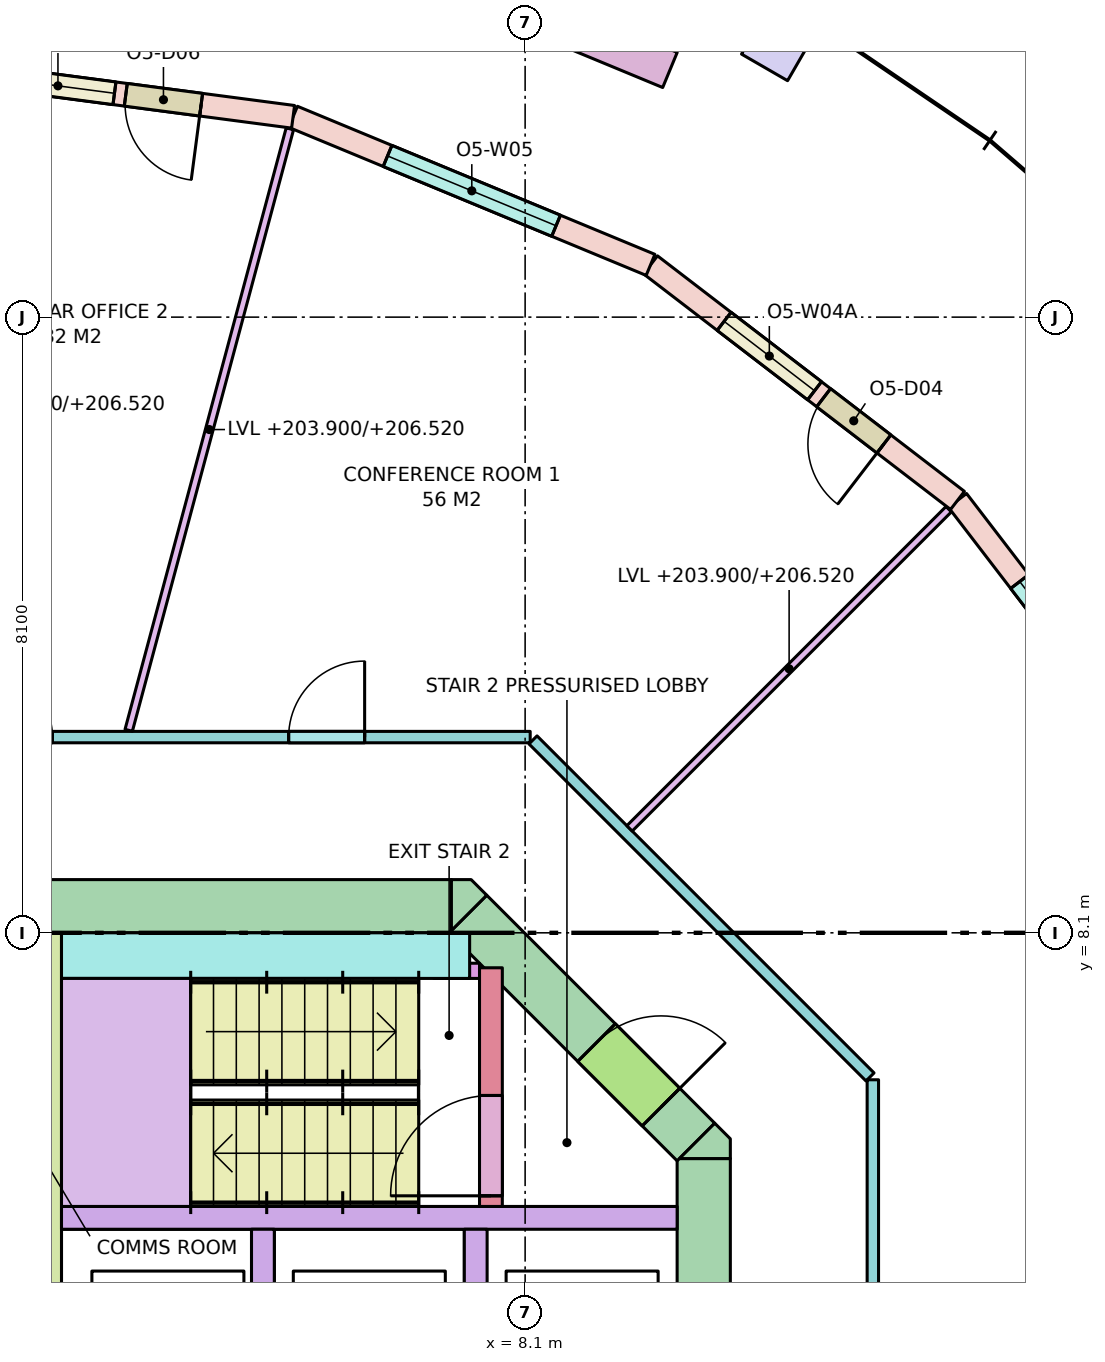
"""IFC4 building model, lengths in metres.
Left out: names, types, materials, properties, quantities, classifications, styles, units other than length and angle.
Written with IfcOpenShell. Run it as: python <this file> out.ifc"""

import sys

from ifc_helpers import new_model, si_unit, direction, frame, frame_2d, origin, origin_2d, place, context, subcontext, project, spatial, polyline, rectangle, outline, extrude, element, fill, save


model = new_model("IFC4")
c1 = context("Model", 3, precision=1e-05, world=origin(), true_north=direction((0.0, 1.0)))
c2 = subcontext(c1, "Body", "Model", "MODEL_VIEW")
j1 = project(units=[si_unit("LENGTHUNIT", "METRE"), si_unit("PLANEANGLEUNIT", "RADIAN")], contexts=[c1])
p1 = place(None, origin())
s1 = spatial("IfcSite", under=j1, at=p1, CompositionType="ELEMENT")
p2 = place(p1, origin())
s2 = spatial("IfcBuilding", under=s1, at=p2, CompositionType="ELEMENT")
p3 = place(p2, frame((0.0, 0.0, 203.9)))
s3 = spatial("IfcBuildingStorey", under=s2, at=p3, CompositionType="ELEMENT", Elevation=203.9)
p4 = place(p3, frame((11.5, 19.919, 0.0), z_axis=(0.0, 0.0, 1.0), x_axis=(-0.866025403784, 0.5, 0.0)))
e1 = element("IfcColumn", 1, at=p4, inside=s3, PredefinedType="COLUMN", context=c2, shape_type="SweptSolid", body=[
    extrude(rectangle(XDim=0.7, YDim=1.0, at=origin_2d()), origin(), (0.0, 0.0, 1.0), 3.7),
])
p5 = place(p3, frame((-7.13, 8.45, -0.28), z_axis=(0.0, 0.0, 1.0), x_axis=(1.0, 0.0, 0.0)))
e2 = element("IfcWall", 2, at=p5, inside=s3, PredefinedType="SHEAR", context=c2, shape_type="SweptSolid", body=[
    extrude(rectangle(XDim=14.26, YDim=0.7, at=frame_2d((7.13, 0.0))), origin(), (0.0, 0.0, 1.0), 3.7),
])
p6 = place(p5, frame((5.48, 0.0, 0.28)))
e3 = element("IfcOpeningElement", 3, at=p6, cuts=e2, PredefinedType="OPENING", context=c2, shape_type="SweptSolid", body=[
    extrude(rectangle(XDim=0.7, YDim=2.1, at=frame_2d((0.35, 1.05))), frame((0.0, 0.36, 0.0), z_axis=(0.0, -1.0, 0.0), x_axis=(1.0, 0.0, 0.0)), (0.0, 0.0, 1.0), 0.72),
])
p7 = place(p5, frame((6.53, 0.0, 0.28)))
e4 = element("IfcOpeningElement", 4, at=p7, cuts=e2, PredefinedType="OPENING", context=c2, shape_type="SweptSolid", body=[
    extrude(rectangle(XDim=0.85, YDim=2.1, at=frame_2d((0.425, 1.05))), frame((0.0, 0.36, 0.0), z_axis=(0.0, -1.0, 0.0), x_axis=(1.0, 0.0, 0.0)), (0.0, 0.0, 1.0), 0.72),
])
p8 = place(p5, frame((7.83, 0.0, 0.28)))
e5 = element("IfcOpeningElement", 5, at=p8, cuts=e2, PredefinedType="OPENING", context=c2, shape_type="SweptSolid", body=[
    extrude(rectangle(XDim=0.85, YDim=2.1, at=frame_2d((0.425, 1.05))), frame((0.0, 0.36, 0.0), z_axis=(0.0, -1.0, 0.0), x_axis=(1.0, 0.0, 0.0)), (0.0, 0.0, 1.0), 0.72),
])
p9 = place(p3, frame((10.45, -5.13, -0.28), z_axis=(0.0, 0.0, 1.0), x_axis=(0.0, 1.0, 0.0)))
e6 = element("IfcWall", 6, at=p9, inside=s3, PredefinedType="SHEAR", context=c2, shape_type="SweptSolid", body=[
    extrude(rectangle(XDim=10.26, YDim=0.7, at=frame_2d((5.13, 0.0))), origin(), (0.0, 0.0, 1.0), 3.7),
])
p10 = place(p9, frame((4.13, 0.0, 0.28)))
e7 = element("IfcOpeningElement", 7, at=p10, cuts=e6, PredefinedType="OPENING", context=c2, shape_type="SweptSolid", body=[
    extrude(rectangle(XDim=2.0, YDim=2.1, at=frame_2d((1.0, 1.05))), frame((0.0, 0.36, 0.0), z_axis=(0.0, -1.0, 0.0), x_axis=(1.0, 0.0, 0.0)), (0.0, 0.0, 1.0), 0.72),
])
p11 = place(p3, frame((7.347, 8.347, -0.28), z_axis=(0.0, 0.0, 1.0), x_axis=(0.707106781187, -0.707106781187, 0.0)))
e8 = element("IfcWall", 8, at=p11, inside=s3, PredefinedType="SHEAR", context=c2, shape_type="SweptSolid", body=[
    extrude(rectangle(XDim=4.243, YDim=0.7, at=frame_2d((2.121, 0.0))), origin(), (0.0, 0.0, 1.0), 3.7),
])
p12 = place(p11, frame((2.393, 0.0, 0.28)))
e9 = element("IfcOpeningElement", 9, at=p12, cuts=e8, PredefinedType="OPENING", context=c2, shape_type="SweptSolid", body=[
    extrude(rectangle(XDim=1.2, YDim=2.1, at=frame_2d((0.6, 1.05))), frame((0.0, 0.36, 0.0), z_axis=(0.0, -1.0, 0.0), x_axis=(1.0, 0.0, 0.0)), (0.0, 0.0, 1.0), 0.72),
])
p13 = place(p3, frame((0.0, 0.0, -0.28)))
e10 = element("IfcWall", 10, at=p13, inside=s3, PredefinedType="SHEAR", context=c2, shape_type="SweptSolid", body=[
    extrude(outline(polyline([(10.8, 5.39), (10.8, 5.13), (10.8, 5.13), (10.13, 5.13), (10.595, 5.595), (10.595, 5.595), (10.595, 5.595), (10.8, 5.39)])), origin(), (0.0, 0.0, 1.0), 3.7),
])
p14 = place(p3, frame((0.0, 0.0, -0.28)))
e11 = element("IfcWall", 11, at=p14, inside=s3, PredefinedType="SHEAR", context=c2, shape_type="SweptSolid", body=[
    extrude(outline(polyline([(7.39, 8.8), (7.595, 8.595), (7.595, 8.595), (7.595, 8.595), (7.13, 8.13), (7.13, 8.8), (7.13, 8.8), (7.39, 8.8)])), origin(), (0.0, 0.0, 1.0), 3.7),
])
p15 = place(p3, frame((2.0, 4.35, 0.0), z_axis=(0.0, 0.0, 1.0), x_axis=(1.0, 0.0, 0.0)))
e12 = element("IfcWall", 12, at=p15, inside=s3, PredefinedType="SOLIDWALL", context=c2, shape_type="SweptSolid", body=[
    extrude(rectangle(XDim=8.1, YDim=0.3, at=frame_2d((4.05, 0.0))), origin(), (0.0, 0.0, 1.0), 3.42),
])
for number, where, z_axis, x_axis in (
    (13, (4.65, 1.8, 0.0), (0.0, 0.0, 1.0), (0.0, 1.0, 0.0)),
    (14, (7.45, 1.8, 0.0), (0.0, 0.0, 1.0), (0.0, 1.0, 0.0)),
):
    element("IfcWall", number, at=place(p3, frame(where, z_axis=z_axis, x_axis=x_axis)), inside=s3, PredefinedType="SOLIDWALL", context=c2, shape_type="SweptSolid", body=[
        extrude(rectangle(XDim=2.4, YDim=0.3, at=frame_2d((1.2, 0.0))), origin(), (0.0, 0.0, 1.0), 3.42),
    ])
p16 = place(p3, frame((1.85, 1.5, 0.0), z_axis=(0.0, 0.0, 1.0), x_axis=(0.0, 1.0, 0.0)))
e15 = element("IfcWall", 15, at=p16, inside=s3, PredefinedType="SHEAR", context=c2, shape_type="SweptSolid", body=[
    extrude(rectangle(XDim=6.6, YDim=0.3, at=frame_2d((3.3, 0.0))), origin(), (0.0, 0.0, 1.0), 3.42),
])
p17 = place(p3, frame((7.65, 4.5, 0.0), z_axis=(0.0, 0.0, 1.0), x_axis=(0.0, 1.0, 0.0)))
e16 = element("IfcWall", 16, at=p17, inside=s3, PredefinedType="SHEAR", context=c2, shape_type="SweptSolid", body=[
    extrude(rectangle(XDim=3.14, YDim=0.3, at=frame_2d((1.57, 0.0))), origin(), (0.0, 0.0, 1.0), 3.42),
])
p18 = place(p17, frame((0.14, 0.0, 0.0)))
e17 = element("IfcOpeningElement", 17, at=p18, cuts=e16, PredefinedType="OPENING", context=c2, shape_type="SweptSolid", body=[
    extrude(rectangle(XDim=1.32, YDim=2.1, at=frame_2d((0.66, 1.05))), frame((0.0, 0.16, 0.0), z_axis=(0.0, -1.0, 0.0), x_axis=(1.0, 0.0, 0.0)), (0.0, 0.0, 1.0), 0.32),
])
p19 = place(p3, frame((2.0, 7.8, 0.0), z_axis=(0.0, 0.0, 1.0), x_axis=(1.0, 0.0, 0.0)))
e18 = element("IfcWall", 18, at=p19, inside=s3, PredefinedType="SHEAR", context=c2, shape_type="SweptSolid", body=[
    extrude(rectangle(XDim=5.37, YDim=0.6, at=frame_2d((2.685, 0.0))), origin(), (0.0, 0.0, 1.0), 3.42),
])
p20 = place(p3, frame((6.9, 7.6, 0.0), z_axis=(0.0, 0.0, 1.0), x_axis=(1.0, 0.0, 0.0)))
e19 = element("IfcWall", 19, at=p20, inside=s3, PredefinedType="SHEAR", context=c2, shape_type="SweptSolid", body=[
    extrude(rectangle(XDim=0.6, YDim=0.2, at=frame_2d((0.3, 0.0))), origin(), (0.0, 0.0, 1.0), 3.42),
])
p21 = place(p3, frame((16.887, 9.75, 0.0), z_axis=(0.0, 0.0, 1.0), x_axis=(-0.608757714995, 0.79335619014, 0.0)))
e20 = element("IfcWall", 20, at=p21, inside=s3, PredefinedType="STANDARD", context=c2, shape_type="SweptSolid", body=[
    extrude(rectangle(XDim=5.091, YDim=0.3, at=frame_2d((2.545, 0.0))), origin(), (0.0, 0.0, 1.0), 3.42),
])
p22 = place(p21, frame((1.345, 0.0, 0.8)))
e21 = element("IfcOpeningElement", 21, at=p22, cuts=e20, PredefinedType="OPENING", context=c2, shape_type="SweptSolid", body=[
    extrude(rectangle(XDim=2.4, YDim=2.4, at=frame_2d((1.2, 1.2))), frame((0.0, 0.16, 0.0), z_axis=(0.0, -1.0, 0.0), x_axis=(1.0, 0.0, 0.0)), (0.0, 0.0, 1.0), 0.32),
])
p23 = place(p3, frame((13.789, 13.789, 0.0), z_axis=(0.0, 0.0, 1.0), x_axis=(-0.79335619014, 0.608757714995, 0.0)))
e22 = element("IfcWall", 22, at=p23, inside=s3, PredefinedType="STANDARD", context=c2, shape_type="SweptSolid", body=[
    extrude(rectangle(XDim=5.091, YDim=0.3, at=frame_2d((2.545, 0.0))), origin(), (0.0, 0.0, 1.0), 3.42),
])
p24 = place(p23, frame((1.22, 0.0, 0.0)))
e23 = element("IfcOpeningElement", 23, at=p24, cuts=e22, PredefinedType="OPENING", context=c2, shape_type="SweptSolid", body=[
    extrude(rectangle(XDim=1.0, YDim=2.4, at=frame_2d((0.5, 1.2))), frame((0.0, 0.16, 0.0), z_axis=(0.0, -1.0, 0.0), x_axis=(1.0, 0.0, 0.0)), (0.0, 0.0, 1.0), 0.32),
])
p25 = place(p23, frame((2.37, 0.0, 0.8)))
e24 = element("IfcOpeningElement", 24, at=p25, cuts=e22, PredefinedType="OPENING", context=c2, shape_type="SweptSolid", body=[
    extrude(rectangle(XDim=1.5, YDim=2.4, at=frame_2d((0.75, 1.2))), frame((0.0, 0.16, 0.0), z_axis=(0.0, -1.0, 0.0), x_axis=(1.0, 0.0, 0.0)), (0.0, 0.0, 1.0), 0.32),
])
p26 = place(p3, frame((9.75, 16.887, 0.0), z_axis=(0.0, 0.0, 1.0), x_axis=(-0.923862504675, 0.382724538613, 0.0)))
e25 = element("IfcWall", 25, at=p26, inside=s3, PredefinedType="STANDARD", context=c2, shape_type="SweptSolid", body=[
    extrude(rectangle(XDim=5.091, YDim=0.3, at=frame_2d((2.545, 0.0))), origin(), (0.0, 0.0, 1.0), 3.42),
])
p27 = place(p26, frame((1.345, 0.0, 0.8)))
e26 = element("IfcOpeningElement", 26, at=p27, cuts=e25, PredefinedType="OPENING", context=c2, shape_type="SweptSolid", body=[
    extrude(rectangle(XDim=2.4, YDim=2.4, at=frame_2d((1.2, 1.2))), frame((0.0, 0.16, 0.0), z_axis=(0.0, -1.0, 0.0), x_axis=(1.0, 0.0, 0.0)), (0.0, 0.0, 1.0), 0.32),
])
p28 = place(p3, frame((5.047, 18.836, 0.0), z_axis=(0.0, 0.0, 1.0), x_axis=(-0.99144890792, 0.130495451964, 0.0)))
e27 = element("IfcWall", 27, at=p28, inside=s3, PredefinedType="STANDARD", context=c2, shape_type="SweptSolid", body=[
    extrude(rectangle(XDim=5.091, YDim=0.3, at=frame_2d((2.545, 0.0))), origin(), (0.0, 0.0, 1.0), 3.42),
])
p29 = place(p28, frame((1.22, 0.0, 0.0)))
e28 = element("IfcOpeningElement", 28, at=p29, cuts=e27, PredefinedType="OPENING", context=c2, shape_type="SweptSolid", body=[
    extrude(rectangle(XDim=1.0, YDim=2.4, at=frame_2d((0.5, 1.2))), frame((0.0, 0.16, 0.0), z_axis=(0.0, -1.0, 0.0), x_axis=(1.0, 0.0, 0.0)), (0.0, 0.0, 1.0), 0.32),
])
p30 = place(p28, frame((2.37, 0.0, 0.8)))
e29 = element("IfcOpeningElement", 29, at=p30, cuts=e27, PredefinedType="OPENING", context=c2, shape_type="SweptSolid", body=[
    extrude(rectangle(XDim=1.5, YDim=2.4, at=frame_2d((0.75, 1.2))), frame((0.0, 0.16, 0.0), z_axis=(0.0, -1.0, 0.0), x_axis=(1.0, 0.0, 0.0)), (0.0, 0.0, 1.0), 0.32),
])
p31 = place(p3, frame((10.006, 19.452, 0.0), z_axis=(0.0, 0.0, 1.0), x_axis=(-0.923885420167, 0.382669217998, 0.0)))
e30 = element("IfcWall", 30, at=p31, inside=s3, PredefinedType="PARAPET", context=c2, shape_type="SweptSolid", body=[
    extrude(rectangle(XDim=3.6, YDim=0.5, at=frame_2d((1.8, 0.0))), origin(), (0.0, 0.0, 1.0), 0.9),
])
p32 = place(p3, frame((-8.167, 10.675, 0.0), z_axis=(0.0, 0.0, 1.0), x_axis=(1.0, 0.0, 0.0)))
e31 = element("IfcWall", 31, at=p32, inside=s3, PredefinedType="PARTITIONING", context=c2, shape_type="SweptSolid", body=[
    extrude(rectangle(XDim=16.333, YDim=0.15, at=frame_2d((8.167, 0.0))), origin(), (0.0, 0.0, 1.0), 2.62),
])
p33 = place(p32, frame((13.155, 0.0, 0.0)))
e32 = element("IfcOpeningElement", 32, at=p33, cuts=e31, PredefinedType="OPENING", context=c2, shape_type="SweptSolid", body=[
    extrude(rectangle(XDim=1.0, YDim=2.1, at=frame_2d((0.5, 1.05))), frame((0.0, 0.085, 0.0), z_axis=(0.0, -1.0, 0.0), x_axis=(1.0, 0.0, 0.0)), (0.0, 0.0, 1.0), 0.17),
])
p34 = place(p32, frame((9.148, 0.0, 0.0)))
e33 = element("IfcOpeningElement", 33, at=p34, cuts=e31, PredefinedType="OPENING", context=c2, shape_type="SweptSolid", body=[
    extrude(rectangle(XDim=0.9, YDim=2.1, at=frame_2d((0.45, 1.05))), frame((0.0, 0.085, 0.0), z_axis=(0.0, -1.0, 0.0), x_axis=(1.0, 0.0, 0.0)), (0.0, 0.0, 1.0), 0.17),
])
p35 = place(p32, frame((5.835, 0.0, 0.0)))
e34 = element("IfcOpeningElement", 34, at=p35, cuts=e31, PredefinedType="OPENING", context=c2, shape_type="SweptSolid", body=[
    extrude(rectangle(XDim=1.8, YDim=2.1, at=frame_2d((0.9, 1.05))), frame((0.0, 0.085, 0.0), z_axis=(0.0, -1.0, 0.0), x_axis=(1.0, 0.0, 0.0)), (0.0, 0.0, 1.0), 0.17),
])
p36 = place(p32, frame((2.751, 0.0, 0.0)))
e35 = element("IfcOpeningElement", 35, at=p36, cuts=e31, PredefinedType="OPENING", context=c2, shape_type="SweptSolid", body=[
    extrude(rectangle(XDim=1.8, YDim=2.1, at=frame_2d((0.9, 1.05))), frame((0.0, 0.085, 0.0), z_axis=(0.0, -1.0, 0.0), x_axis=(1.0, 0.0, 0.0)), (0.0, 0.0, 1.0), 0.17),
])
p37 = place(p3, frame((8.204, 10.638, 0.0), z_axis=(0.0, 0.0, 1.0), x_axis=(0.707106781187, -0.707106781187, 0.0)))
e36 = element("IfcWall", 36, at=p37, inside=s3, PredefinedType="PARTITIONING", context=c2, shape_type="SweptSolid", body=[
    extrude(rectangle(XDim=6.271, YDim=0.15, at=frame_2d((3.135, 0.0))), origin(), (0.0, 0.0, 1.0), 2.62),
])
p38 = place(p3, frame((12.675, 6.167, 0.0), z_axis=(0.0, 0.0, 1.0), x_axis=(0.0, -1.0, 0.0)))
e37 = element("IfcWall", 37, at=p38, inside=s3, PredefinedType="PARTITIONING", context=c2, shape_type="SweptSolid", body=[
    extrude(rectangle(XDim=12.333, YDim=0.15, at=frame_2d((6.167, 0.0))), origin(), (0.0, 0.0, 1.0), 2.62),
])
p39 = place(p38, frame((5.267, 0.0, 0.0)))
e38 = element("IfcOpeningElement", 38, at=p39, cuts=e37, PredefinedType="OPENING", context=c2, shape_type="SweptSolid", body=[
    extrude(rectangle(XDim=1.8, YDim=2.1, at=frame_2d((0.9, 1.05))), frame((0.0, 0.085, 0.0), z_axis=(0.0, -1.0, 0.0), x_axis=(1.0, 0.0, 0.0)), (0.0, 0.0, 1.0), 0.17),
])
p40 = place(p3, frame((9.474, 9.474, 0.0), z_axis=(0.0, 0.0, 1.0), x_axis=(0.707106781187, 0.707106781187, 0.0)))
e39 = element("IfcWall", 39, at=p40, inside=s3, PredefinedType="PARTITIONING", context=c2, shape_type="SweptSolid", body=[
    extrude(rectangle(XDim=5.938, YDim=0.1, at=frame_2d((2.969, 0.0))), origin(), (0.0, 0.0, 1.0), 2.62),
])
p41 = place(p3, frame((2.884, 10.764, 0.0), z_axis=(0.0, 0.0, 1.0), x_axis=(0.258818011497, 0.965926103242, 0.0)))
e40 = element("IfcWall", 40, at=p41, inside=s3, PredefinedType="PARTITIONING", context=c2, shape_type="SweptSolid", body=[
    extrude(rectangle(XDim=8.192, YDim=0.1, at=frame_2d((4.096, 0.0))), origin(), (0.0, 0.0, 1.0), 2.62),
])
p42 = place(p22, origin())
e41 = element("IfcWindow", 41, at=p42, inside=s3, PartitioningType="SINGLE_PANEL", PredefinedType="WINDOW", context=c2, shape_type="SweptSolid", body=[
    extrude(rectangle(XDim=2.4, YDim=2.4, at=frame_2d((1.2, 1.2))), frame((0.0, 0.03, 0.0), z_axis=(0.0, -1.0, 0.0), x_axis=(1.0, 0.0, 0.0)), (0.0, 0.0, 1.0), 0.06),
])
fill(e21, e41)
p43 = place(p24, origin())
e42 = element("IfcDoor", 42, at=p43, inside=s3, OperationType="SINGLE_SWING_LEFT", PredefinedType="DOOR", context=c2, shape_type="SweptSolid", body=[
    extrude(rectangle(XDim=1.0, YDim=2.4, at=frame_2d((0.5, 1.2))), frame((0.0, 0.025, 0.0), z_axis=(0.0, -1.0, 0.0), x_axis=(1.0, 0.0, 0.0)), (0.0, 0.0, 1.0), 0.05),
])
fill(e23, e42)
p44 = place(p25, origin())
e43 = element("IfcWindow", 43, at=p44, inside=s3, PartitioningType="SINGLE_PANEL", PredefinedType="WINDOW", context=c2, shape_type="SweptSolid", body=[
    extrude(rectangle(XDim=1.5, YDim=2.4, at=frame_2d((0.75, 1.2))), frame((0.0, 0.03, 0.0), z_axis=(0.0, -1.0, 0.0), x_axis=(1.0, 0.0, 0.0)), (0.0, 0.0, 1.0), 0.06),
])
fill(e24, e43)
p45 = place(p27, origin())
e44 = element("IfcWindow", 44, at=p45, inside=s3, PartitioningType="SINGLE_PANEL", PredefinedType="WINDOW", context=c2, shape_type="SweptSolid", body=[
    extrude(rectangle(XDim=2.4, YDim=2.4, at=frame_2d((1.2, 1.2))), frame((0.0, 0.03, 0.0), z_axis=(0.0, -1.0, 0.0), x_axis=(1.0, 0.0, 0.0)), (0.0, 0.0, 1.0), 0.06),
])
fill(e26, e44)
p46 = place(p29, origin())
e45 = element("IfcDoor", 45, at=p46, inside=s3, OperationType="SINGLE_SWING_LEFT", PredefinedType="DOOR", context=c2, shape_type="SweptSolid", body=[
    extrude(rectangle(XDim=1.0, YDim=2.4, at=frame_2d((0.5, 1.2))), frame((0.0, 0.025, 0.0), z_axis=(0.0, -1.0, 0.0), x_axis=(1.0, 0.0, 0.0)), (0.0, 0.0, 1.0), 0.05),
])
fill(e28, e45)
p47 = place(p30, origin())
e46 = element("IfcWindow", 46, at=p47, inside=s3, PartitioningType="SINGLE_PANEL", PredefinedType="WINDOW", context=c2, shape_type="SweptSolid", body=[
    extrude(rectangle(XDim=1.5, YDim=2.4, at=frame_2d((0.75, 1.2))), frame((0.0, 0.03, 0.0), z_axis=(0.0, -1.0, 0.0), x_axis=(1.0, 0.0, 0.0)), (0.0, 0.0, 1.0), 0.06),
])
fill(e29, e46)
p48 = place(p18, origin())
e47 = element("IfcDoor", 47, at=p48, inside=s3, OperationType="DOUBLE_DOOR_SINGLE_SWING", PredefinedType="DOOR", context=c2, shape_type="SweptSolid", body=[
    extrude(rectangle(XDim=1.32, YDim=2.1, at=frame_2d((0.66, 1.05))), frame((0.0, 0.025, 0.0), z_axis=(0.0, -1.0, 0.0), x_axis=(1.0, 0.0, 0.0)), (0.0, 0.0, 1.0), 0.05),
])
fill(e17, e47)
p49 = place(p12, origin())
e48 = element("IfcDoor", 48, at=p49, inside=s3, OperationType="SINGLE_SWING_RIGHT", PredefinedType="DOOR", context=c2, shape_type="SweptSolid", body=[
    extrude(rectangle(XDim=1.2, YDim=2.1, at=frame_2d((0.6, 1.05))), frame((0.0, 0.025, 0.0), z_axis=(0.0, -1.0, 0.0), x_axis=(1.0, 0.0, 0.0)), (0.0, 0.0, 1.0), 0.05),
])
fill(e9, e48)
p50 = place(p33, origin())
e49 = element("IfcDoor", 49, at=p50, inside=s3, OperationType="SINGLE_SWING_RIGHT", PredefinedType="DOOR", context=c2, shape_type="SweptSolid", body=[
    extrude(rectangle(XDim=1.0, YDim=2.1, at=frame_2d((0.5, 1.05))), frame((0.0, 0.025, 0.0), z_axis=(0.0, -1.0, 0.0), x_axis=(1.0, 0.0, 0.0)), (0.0, 0.0, 1.0), 0.05),
])
fill(e32, e49)
p51 = place(p34, origin())
e50 = element("IfcDoor", 50, at=p51, inside=s3, OperationType="SINGLE_SWING_LEFT", PredefinedType="DOOR", context=c2, shape_type="SweptSolid", body=[
    extrude(rectangle(XDim=0.9, YDim=2.1, at=frame_2d((0.45, 1.05))), frame((0.0, 0.025, 0.0), z_axis=(0.0, -1.0, 0.0), x_axis=(1.0, 0.0, 0.0)), (0.0, 0.0, 1.0), 0.05),
])
fill(e33, e50)
save(model, sys.argv[1])
